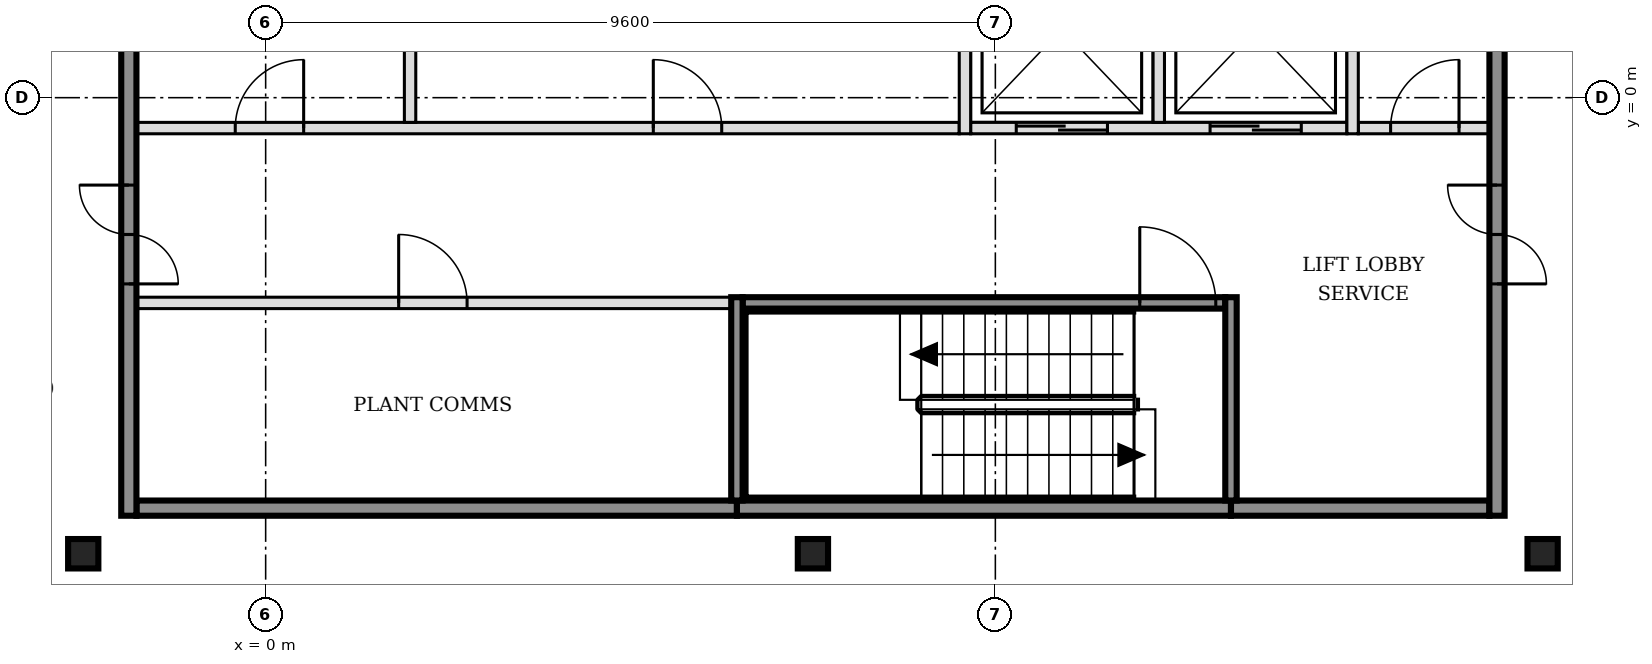
"""IFC4 building model, lengths in metres.
Left out: names, types, materials, properties, quantities, classifications, styles, units other than length and angle.
Written with IfcOpenShell. Run it as: python <this file> out.ifc"""

import sys

from ifc_helpers import new_model, si_unit, direction, frame, frame_2d, origin, origin_2d, place, context, subcontext, project, spatial, rectangle, i_section, extrude, element, fill, save


model = new_model("IFC4")
c1 = context("Model", 3, precision=1e-05, world=origin(), true_north=direction((0.0, 1.0)))
c2 = subcontext(c1, "Body", "Model", "MODEL_VIEW")
j1 = project(units=[si_unit("LENGTHUNIT", "METRE"), si_unit("PLANEANGLEUNIT", "RADIAN")], contexts=[c1])
p1 = place(None, origin())
s1 = spatial("IfcSite", under=j1, at=p1, CompositionType="ELEMENT")
p2 = place(p1, origin())
s2 = spatial("IfcBuilding", under=s1, at=p2, CompositionType="ELEMENT")
p3 = place(p2, frame((0.0, 0.0, 288.6)))
s3 = spatial("IfcBuildingStorey", under=s2, at=p3, CompositionType="ELEMENT", Elevation=288.6)
for number, where, z_axis, x_axis in (
    (1, (-2.4, -6.0, -0.15), (0.0, 0.0, 1.0), (1.0, 0.0, 0.0)),
    (2, (7.2, -6.0, -0.15), (0.0, 0.0, 1.0), (1.0, 0.0, 0.0)),
    (3, (16.8, -6.0, -0.15), (0.0, 0.0, 1.0), (1.0, 0.0, 0.0)),
):
    element("IfcColumn", number, at=place(p3, frame(where, z_axis=z_axis, x_axis=x_axis)), inside=s3, PredefinedType="COLUMN", context=c2, shape_type="SweptSolid", body=[
        extrude(i_section(OverallWidth=0.398, OverallDepth=0.387, WebThickness=0.021, FlangeThickness=0.033, FilletRadius=0.015, at=origin_2d()), origin(), (0.0, 0.0, 1.0), 3.6),
    ])
p4 = place(p3, frame((-1.7, -5.4, 0.0), z_axis=(0.0, 0.0, 1.0), x_axis=(1.0, 0.0, 0.0)))
e4 = element("IfcWall", 4, at=p4, inside=s3, PredefinedType="SOLIDWALL", context=c2, shape_type="SweptSolid", body=[
    extrude(rectangle(XDim=7.9, YDim=0.2, at=frame_2d((3.95, 0.0))), origin(), (0.0, 0.0, 1.0), 3.45),
])
p5 = place(p3, frame((6.2, -5.4, 0.0), z_axis=(0.0, 0.0, 1.0), x_axis=(1.0, 0.0, 0.0)))
e5 = element("IfcWall", 5, at=p5, inside=s3, PredefinedType="SOLIDWALL", context=c2, shape_type="SweptSolid", body=[
    extrude(rectangle(XDim=6.5, YDim=0.2, at=frame_2d((3.25, 0.0))), origin(), (0.0, 0.0, 1.0), 3.45),
])
p6 = place(p3, frame((12.7, -5.4, 0.0), z_axis=(0.0, 0.0, 1.0), x_axis=(1.0, 0.0, 0.0)))
e6 = element("IfcWall", 6, at=p6, inside=s3, PredefinedType="SOLIDWALL", context=c2, shape_type="SweptSolid", body=[
    extrude(rectangle(XDim=3.4, YDim=0.2, at=frame_2d((1.7, 0.0))), origin(), (0.0, 0.0, 1.0), 3.45),
])
p7 = place(p3, frame((-1.7, -2.7, 0.0), z_axis=(0.0, 0.0, 1.0), x_axis=(1.0, 0.0, 0.0)))
e7 = element("IfcWall", 7, at=p7, inside=s3, PredefinedType="PARTITIONING", context=c2, shape_type="SweptSolid", body=[
    extrude(rectangle(XDim=7.825, YDim=0.15, at=frame_2d((3.913, 0.0))), origin(), (0.0, 0.0, 1.0), 3.45),
])
p8 = place(p7, frame((3.45, 0.0, 0.0)))
e8 = element("IfcOpeningElement", 8, at=p8, cuts=e7, PredefinedType="OPENING", context=c2, shape_type="SweptSolid", body=[
    extrude(rectangle(XDim=0.9, YDim=2.1, at=frame_2d((0.45, 1.05))), frame((0.0, 0.085, 0.0), z_axis=(0.0, -1.0, 0.0), x_axis=(1.0, 0.0, 0.0)), (0.0, 0.0, 1.0), 0.17),
])
p9 = place(p3, frame((6.275, -2.7, 0.0), z_axis=(0.0, 0.0, 1.0), x_axis=(1.0, 0.0, 0.0)))
e9 = element("IfcWall", 9, at=p9, inside=s3, PredefinedType="SOLIDWALL", context=c2, shape_type="SweptSolid", body=[
    extrude(rectangle(XDim=6.35, YDim=0.15, at=frame_2d((3.175, 0.0))), origin(), (0.0, 0.0, 1.0), 3.45),
])
p10 = place(p9, frame((5.225, 0.0, 0.0)))
e10 = element("IfcOpeningElement", 10, at=p10, cuts=e9, PredefinedType="OPENING", context=c2, shape_type="SweptSolid", body=[
    extrude(rectangle(XDim=1.0, YDim=2.1, at=frame_2d((0.5, 1.05))), frame((0.0, 0.085, 0.0), z_axis=(0.0, -1.0, 0.0), x_axis=(1.0, 0.0, 0.0)), (0.0, 0.0, 1.0), 0.17),
])
p11 = place(p3, frame((-1.7, -0.4, 0.0), z_axis=(0.0, 0.0, 1.0), x_axis=(1.0, 0.0, 0.0)))
e11 = element("IfcWall", 11, at=p11, inside=s3, PredefinedType="PARTITIONING", context=c2, shape_type="SweptSolid", body=[
    extrude(rectangle(XDim=10.825, YDim=0.15, at=frame_2d((5.413, 0.0))), origin(), (0.0, 0.0, 1.0), 3.45),
])
p12 = place(p11, frame((1.3, 0.0, 0.0)))
e12 = element("IfcOpeningElement", 12, at=p12, cuts=e11, PredefinedType="OPENING", context=c2, shape_type="SweptSolid", body=[
    extrude(rectangle(XDim=0.9, YDim=2.1, at=frame_2d((0.45, 1.05))), frame((0.0, 0.085, 0.0), z_axis=(0.0, -1.0, 0.0), x_axis=(1.0, 0.0, 0.0)), (0.0, 0.0, 1.0), 0.17),
])
p13 = place(p11, frame((6.8, 0.0, 0.0)))
e13 = element("IfcOpeningElement", 13, at=p13, cuts=e11, PredefinedType="OPENING", context=c2, shape_type="SweptSolid", body=[
    extrude(rectangle(XDim=0.9, YDim=2.1, at=frame_2d((0.45, 1.05))), frame((0.0, 0.085, 0.0), z_axis=(0.0, -1.0, 0.0), x_axis=(1.0, 0.0, 0.0)), (0.0, 0.0, 1.0), 0.17),
])
p14 = place(p3, frame((9.275, -0.4, 0.0), z_axis=(0.0, 0.0, 1.0), x_axis=(1.0, 0.0, 0.0)))
e14 = element("IfcWall", 14, at=p14, inside=s3, PredefinedType="SOLIDWALL", context=c2, shape_type="SweptSolid", body=[
    extrude(rectangle(XDim=4.95, YDim=0.15, at=frame_2d((2.475, 0.0))), origin(), (0.0, 0.0, 1.0), 3.45),
])
p15 = place(p14, frame((0.6, 0.0, 0.0)))
e15 = element("IfcOpeningElement", 15, at=p15, cuts=e14, PredefinedType="OPENING", context=c2, shape_type="SweptSolid", body=[
    extrude(rectangle(XDim=1.2, YDim=2.1, at=frame_2d((0.6, 1.05))), frame((0.0, 0.085, 0.0), z_axis=(0.0, -1.0, 0.0), x_axis=(1.0, 0.0, 0.0)), (0.0, 0.0, 1.0), 0.17),
])
p16 = place(p14, frame((3.15, 0.0, 0.0)))
e16 = element("IfcOpeningElement", 16, at=p16, cuts=e14, PredefinedType="OPENING", context=c2, shape_type="SweptSolid", body=[
    extrude(rectangle(XDim=1.2, YDim=2.1, at=frame_2d((0.6, 1.05))), frame((0.0, 0.085, 0.0), z_axis=(0.0, -1.0, 0.0), x_axis=(1.0, 0.0, 0.0)), (0.0, 0.0, 1.0), 0.17),
])
p17 = place(p3, frame((14.375, -0.4, 0.0), z_axis=(0.0, 0.0, 1.0), x_axis=(1.0, 0.0, 0.0)))
e17 = element("IfcWall", 17, at=p17, inside=s3, PredefinedType="PARTITIONING", context=c2, shape_type="SweptSolid", body=[
    extrude(rectangle(XDim=1.725, YDim=0.15, at=frame_2d((0.863, 0.0))), origin(), (0.0, 0.0, 1.0), 3.45),
])
p18 = place(p17, frame((0.425, 0.0, 0.0)))
e18 = element("IfcOpeningElement", 18, at=p18, cuts=e17, PredefinedType="OPENING", context=c2, shape_type="SweptSolid", body=[
    extrude(rectangle(XDim=0.9, YDim=2.1, at=frame_2d((0.45, 1.05))), frame((0.0, 0.085, 0.0), z_axis=(0.0, -1.0, 0.0), x_axis=(1.0, 0.0, 0.0)), (0.0, 0.0, 1.0), 0.17),
])
p19 = place(p3, frame((-1.8, -5.5, 0.0), z_axis=(0.0, 0.0, 1.0), x_axis=(0.0, 1.0, 0.0)))
e19 = element("IfcWall", 19, at=p19, inside=s3, PredefinedType="SOLIDWALL", context=c2, shape_type="SweptSolid", body=[
    extrude(rectangle(XDim=15.8, YDim=0.2, at=frame_2d((7.9, 0.0))), origin(), (0.0, 0.0, 1.0), 3.45),
])
p20 = place(p19, frame((3.05, 0.0, 0.0)))
e20 = element("IfcOpeningElement", 20, at=p20, cuts=e19, PredefinedType="OPENING", context=c2, shape_type="SweptSolid", body=[
    extrude(rectangle(XDim=1.3, YDim=2.1, at=frame_2d((0.65, 1.05))), frame((0.0, 0.11, 0.0), z_axis=(0.0, -1.0, 0.0), x_axis=(1.0, 0.0, 0.0)), (0.0, 0.0, 1.0), 0.22),
])
p21 = place(p19, frame((11.45, 0.0, 0.0)))
e21 = element("IfcOpeningElement", 21, at=p21, cuts=e19, PredefinedType="OPENING", context=c2, shape_type="SweptSolid", body=[
    extrude(rectangle(XDim=1.3, YDim=2.1, at=frame_2d((0.65, 1.05))), frame((0.0, 0.11, 0.0), z_axis=(0.0, -1.0, 0.0), x_axis=(1.0, 0.0, 0.0)), (0.0, 0.0, 1.0), 0.22),
])
p22 = place(p3, frame((1.9, -0.325, 0.0), z_axis=(0.0, 0.0, 1.0), x_axis=(0.0, 1.0, 0.0)))
e22 = element("IfcWall", 22, at=p22, inside=s3, PredefinedType="PARTITIONING", context=c2, shape_type="SweptSolid", body=[
    extrude(rectangle(XDim=2.45, YDim=0.15, at=frame_2d((1.225, 0.0))), origin(), (0.0, 0.0, 1.0), 3.45),
])
p23 = place(p3, frame((6.2, -5.3, 0.0), z_axis=(0.0, 0.0, 1.0), x_axis=(0.0, 1.0, 0.0)))
e23 = element("IfcWall", 23, at=p23, inside=s3, PredefinedType="SOLIDWALL", context=c2, shape_type="SweptSolid", body=[
    extrude(rectangle(XDim=2.675, YDim=0.15, at=frame_2d((1.337, 0.0))), origin(), (0.0, 0.0, 1.0), 3.45),
])
p24 = place(p3, frame((9.2, -0.475, 0.0), z_axis=(0.0, 0.0, 1.0), x_axis=(0.0, 1.0, 0.0)))
e24 = element("IfcWall", 24, at=p24, inside=s3, PredefinedType="SOLIDWALL", context=c2, shape_type="SweptSolid", body=[
    extrude(rectangle(XDim=2.6, YDim=0.15, at=frame_2d((1.3, 0.0))), origin(), (0.0, 0.0, 1.0), 3.45),
])
p25 = place(p3, frame((11.75, -0.325, 0.0), z_axis=(0.0, 0.0, 1.0), x_axis=(0.0, 1.0, 0.0)))
e25 = element("IfcWall", 25, at=p25, inside=s3, PredefinedType="SOLIDWALL", context=c2, shape_type="SweptSolid", body=[
    extrude(rectangle(XDim=2.45, YDim=0.15, at=frame_2d((1.225, 0.0))), origin(), (0.0, 0.0, 1.0), 3.45),
])
p26 = place(p3, frame((12.7, -5.3, 0.0), z_axis=(0.0, 0.0, 1.0), x_axis=(0.0, 1.0, 0.0)))
e26 = element("IfcWall", 26, at=p26, inside=s3, PredefinedType="SOLIDWALL", context=c2, shape_type="SweptSolid", body=[
    extrude(rectangle(XDim=2.675, YDim=0.15, at=frame_2d((1.337, 0.0))), origin(), (0.0, 0.0, 1.0), 3.45),
])
p27 = place(p3, frame((14.3, -0.475, 0.0), z_axis=(0.0, 0.0, 1.0), x_axis=(0.0, 1.0, 0.0)))
e27 = element("IfcWall", 27, at=p27, inside=s3, PredefinedType="SOLIDWALL", context=c2, shape_type="SweptSolid", body=[
    extrude(rectangle(XDim=2.75, YDim=0.15, at=frame_2d((1.375, 0.0))), origin(), (0.0, 0.0, 1.0), 3.45),
])
p28 = place(p3, frame((16.2, -5.5, 0.0), z_axis=(0.0, 0.0, 1.0), x_axis=(0.0, 1.0, 0.0)))
e28 = element("IfcWall", 28, at=p28, inside=s3, PredefinedType="SOLIDWALL", context=c2, shape_type="SweptSolid", body=[
    extrude(rectangle(XDim=15.8, YDim=0.2, at=frame_2d((7.9, 0.0))), origin(), (0.0, 0.0, 1.0), 3.45),
])
p29 = place(p28, frame((3.05, 0.0, 0.0)))
e29 = element("IfcOpeningElement", 29, at=p29, cuts=e28, PredefinedType="OPENING", context=c2, shape_type="SweptSolid", body=[
    extrude(rectangle(XDim=1.3, YDim=2.1, at=frame_2d((0.65, 1.05))), frame((0.0, 0.11, 0.0), z_axis=(0.0, -1.0, 0.0), x_axis=(1.0, 0.0, 0.0)), (0.0, 0.0, 1.0), 0.22),
])
p30 = place(p28, frame((11.45, 0.0, 0.0)))
e30 = element("IfcOpeningElement", 30, at=p30, cuts=e28, PredefinedType="OPENING", context=c2, shape_type="SweptSolid", body=[
    extrude(rectangle(XDim=1.3, YDim=2.1, at=frame_2d((0.65, 1.05))), frame((0.0, 0.11, 0.0), z_axis=(0.0, -1.0, 0.0), x_axis=(1.0, 0.0, 0.0)), (0.0, 0.0, 1.0), 0.22),
])
p31 = place(p15, origin())
e31 = element("IfcDoor", 31, at=p31, inside=s3, OperationType="DOUBLE_DOOR_SLIDING", PredefinedType="DOOR", context=c2, shape_type="SweptSolid", body=[
    extrude(rectangle(XDim=1.2, YDim=2.1, at=frame_2d((0.6, 1.05))), frame((0.0, 0.025, 0.0), z_axis=(0.0, -1.0, 0.0), x_axis=(1.0, 0.0, 0.0)), (0.0, 0.0, 1.0), 0.05),
])
fill(e15, e31)
p32 = place(p16, origin())
e32 = element("IfcDoor", 32, at=p32, inside=s3, OperationType="DOUBLE_DOOR_SLIDING", PredefinedType="DOOR", context=c2, shape_type="SweptSolid", body=[
    extrude(rectangle(XDim=1.2, YDim=2.1, at=frame_2d((0.6, 1.05))), frame((0.0, 0.025, 0.0), z_axis=(0.0, -1.0, 0.0), x_axis=(1.0, 0.0, 0.0)), (0.0, 0.0, 1.0), 0.05),
])
fill(e16, e32)
p33 = place(p10, origin())
e33 = element("IfcDoor", 33, at=p33, inside=s3, OperationType="SINGLE_SWING_LEFT", PredefinedType="DOOR", context=c2, shape_type="SweptSolid", body=[
    extrude(rectangle(XDim=1.0, YDim=2.1, at=frame_2d((0.5, 1.05))), frame((0.0, 0.025, 0.0), z_axis=(0.0, -1.0, 0.0), x_axis=(1.0, 0.0, 0.0)), (0.0, 0.0, 1.0), 0.05),
])
fill(e10, e33)
p34 = place(p20, origin())
e34 = element("IfcDoor", 34, at=p34, inside=s3, OperationType="DOUBLE_DOOR_SINGLE_SWING", PredefinedType="DOOR", context=c2, shape_type="SweptSolid", body=[
    extrude(rectangle(XDim=1.3, YDim=2.1, at=frame_2d((0.65, 1.05))), frame((0.0, 0.025, 0.0), z_axis=(0.0, -1.0, 0.0), x_axis=(1.0, 0.0, 0.0)), (0.0, 0.0, 1.0), 0.05),
])
fill(e20, e34)
p35 = place(p29, origin())
e35 = element("IfcDoor", 35, at=p35, inside=s3, OperationType="DOUBLE_DOOR_SINGLE_SWING", PredefinedType="DOOR", context=c2, shape_type="SweptSolid", body=[
    extrude(rectangle(XDim=1.3, YDim=2.1, at=frame_2d((0.65, 1.05))), frame((0.0, 0.025, 0.0), z_axis=(0.0, -1.0, 0.0), x_axis=(1.0, 0.0, 0.0)), (0.0, 0.0, 1.0), 0.05),
])
fill(e29, e35)
p36 = place(p18, origin())
e36 = element("IfcDoor", 36, at=p36, inside=s3, OperationType="SINGLE_SWING_RIGHT", PredefinedType="DOOR", context=c2, shape_type="SweptSolid", body=[
    extrude(rectangle(XDim=0.9, YDim=2.1, at=frame_2d((0.45, 1.05))), frame((0.0, 0.025, 0.0), z_axis=(0.0, -1.0, 0.0), x_axis=(1.0, 0.0, 0.0)), (0.0, 0.0, 1.0), 0.05),
])
fill(e18, e36)
p37 = place(p8, origin())
e37 = element("IfcDoor", 37, at=p37, inside=s3, OperationType="SINGLE_SWING_LEFT", PredefinedType="DOOR", context=c2, shape_type="SweptSolid", body=[
    extrude(rectangle(XDim=0.9, YDim=2.1, at=frame_2d((0.45, 1.05))), frame((0.0, 0.025, 0.0), z_axis=(0.0, -1.0, 0.0), x_axis=(1.0, 0.0, 0.0)), (0.0, 0.0, 1.0), 0.05),
])
fill(e8, e37)
p38 = place(p12, origin())
e38 = element("IfcDoor", 38, at=p38, inside=s3, OperationType="SINGLE_SWING_RIGHT", PredefinedType="DOOR", context=c2, shape_type="SweptSolid", body=[
    extrude(rectangle(XDim=0.9, YDim=2.1, at=frame_2d((0.45, 1.05))), frame((0.0, 0.025, 0.0), z_axis=(0.0, -1.0, 0.0), x_axis=(1.0, 0.0, 0.0)), (0.0, 0.0, 1.0), 0.05),
])
fill(e12, e38)
p39 = place(p13, origin())
e39 = element("IfcDoor", 39, at=p39, inside=s3, OperationType="SINGLE_SWING_LEFT", PredefinedType="DOOR", context=c2, shape_type="SweptSolid", body=[
    extrude(rectangle(XDim=0.9, YDim=2.1, at=frame_2d((0.45, 1.05))), frame((0.0, 0.025, 0.0), z_axis=(0.0, -1.0, 0.0), x_axis=(1.0, 0.0, 0.0)), (0.0, 0.0, 1.0), 0.05),
])
fill(e13, e39)
save(model, sys.argv[1])
